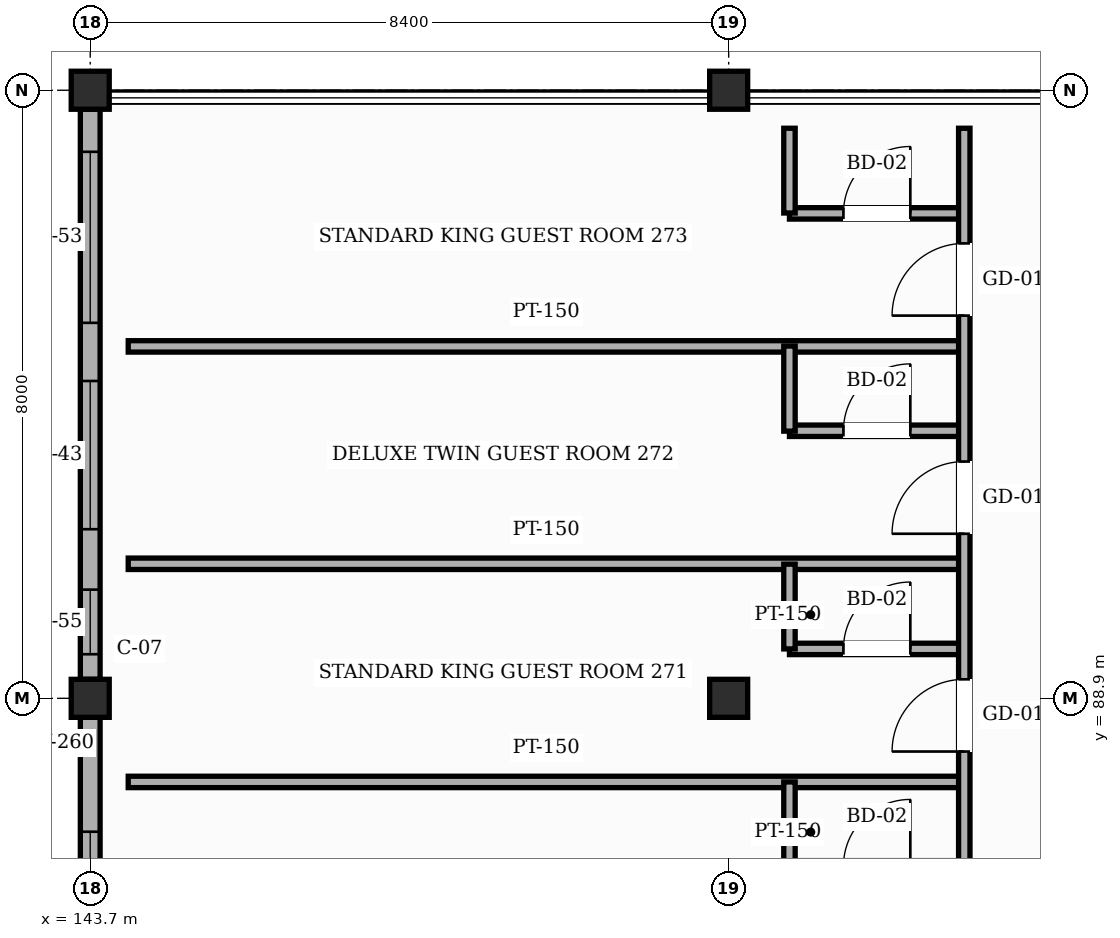
"""IFC4 building model, lengths in metres.
Left out: names, types, materials, properties, quantities, classifications, styles, units other than length and angle.
Written with IfcOpenShell. Run it as: python <this file> out.ifc"""

import sys

from ifc_helpers import new_model, si_unit, direction, frame, frame_2d, origin, origin_2d, place, context, subcontext, project, spatial, rectangle, hollow_rectangle, extrude, element, fill, save


model = new_model("IFC4")
c1 = context("Model", 3, precision=1e-05, world=origin(), true_north=direction((0.0, 1.0)))
c2 = subcontext(c1, "Body", "Model", "MODEL_VIEW")
j1 = project(units=[si_unit("LENGTHUNIT", "METRE"), si_unit("PLANEANGLEUNIT", "RADIAN")], contexts=[c1])
p1 = place(None, origin())
s1 = spatial("IfcSite", under=j1, at=p1, CompositionType="ELEMENT")
p2 = place(p1, origin())
s2 = spatial("IfcBuilding", under=s1, at=p2, CompositionType="ELEMENT")
p3 = place(p2, frame((0.0, 0.0, 39.0)))
s3 = spatial("IfcBuildingStorey", under=s2, at=p3, CompositionType="ELEMENT", Elevation=39.0)
for number, where, z_axis, x_axis in (
    (1, (143.7, 88.9, 0.0), (0.0, 0.0, 1.0), (1.0, 0.0, 0.0)),
    (2, (143.7, 96.9, 0.0), (0.0, 0.0, 1.0), (1.0, 0.0, 0.0)),
    (3, (152.1, 88.9, 0.0), (0.0, 0.0, 1.0), (1.0, 0.0, 0.0)),
    (4, (152.1, 96.9, 0.0), (0.0, 0.0, 1.0), (1.0, 0.0, 0.0)),
):
    element("IfcColumn", number, at=place(p3, frame(where, z_axis=z_axis, x_axis=x_axis)), inside=s3, PredefinedType="COLUMN", context=c2, shape_type="SweptSolid", body=[
        extrude(hollow_rectangle(XDim=0.5, YDim=0.5, WallThickness=0.022, InnerFilletRadius=0.022, OuterFilletRadius=0.044, at=origin_2d()), origin(), (0.0, 0.0, 1.0), 3.38),
    ])
p4 = place(p3, frame((143.7, 81.15, 0.0), z_axis=(0.0, 0.0, 1.0), x_axis=(0.0, 1.0, 0.0)))
e5 = element("IfcWall", 5, at=p4, inside=s3, PredefinedType="SOLIDWALL", context=c2, shape_type="SweptSolid", body=[
    extrude(rectangle(XDim=7.5, YDim=0.26, at=frame_2d((3.75, 0.0))), origin(), (0.0, 0.0, 1.0), 2.805),
])
p5 = place(p4, frame((1.675, 0.0, 0.85)))
e6 = element("IfcOpeningElement", 6, at=p5, cuts=e5, PredefinedType="OPENING", context=c2, shape_type="SweptSolid", body=[
    extrude(rectangle(XDim=1.35, YDim=1.65, at=frame_2d((0.675, 0.825))), frame((0.0, 0.14, 0.0), z_axis=(0.0, -1.0, 0.0), x_axis=(1.0, 0.0, 0.0)), (0.0, 0.0, 1.0), 0.28),
])
p6 = place(p4, frame((4.445, 0.0, 0.85)))
e7 = element("IfcOpeningElement", 7, at=p6, cuts=e5, PredefinedType="OPENING", context=c2, shape_type="SweptSolid", body=[
    extrude(rectangle(XDim=1.55, YDim=1.65, at=frame_2d((0.775, 0.825))), frame((0.0, 0.14, 0.0), z_axis=(0.0, -1.0, 0.0), x_axis=(1.0, 0.0, 0.0)), (0.0, 0.0, 1.0), 0.28),
])
p7 = place(p3, frame((143.7, 89.15, 0.0), z_axis=(0.0, 0.0, 1.0), x_axis=(0.0, 1.0, 0.0)))
e8 = element("IfcWall", 8, at=p7, inside=s3, PredefinedType="SOLIDWALL", context=c2, shape_type="SweptSolid", body=[
    extrude(rectangle(XDim=7.5, YDim=0.26, at=frame_2d((3.75, 0.0))), origin(), (0.0, 0.0, 1.0), 2.805),
])
p8 = place(p7, frame((0.33, 0.0, 0.85)))
e9 = element("IfcOpeningElement", 9, at=p8, cuts=e8, PredefinedType="OPENING", context=c2, shape_type="SweptSolid", body=[
    extrude(rectangle(XDim=0.85, YDim=1.35, at=frame_2d((0.425, 0.675))), frame((0.0, 0.14, 0.0), z_axis=(0.0, -1.0, 0.0), x_axis=(1.0, 0.0, 0.0)), (0.0, 0.0, 1.0), 0.28),
])
p9 = place(p7, frame((1.975, 0.0, 0.85)))
e10 = element("IfcOpeningElement", 10, at=p9, cuts=e8, PredefinedType="OPENING", context=c2, shape_type="SweptSolid", body=[
    extrude(rectangle(XDim=1.95, YDim=1.65, at=frame_2d((0.975, 0.825))), frame((0.0, 0.14, 0.0), z_axis=(0.0, -1.0, 0.0), x_axis=(1.0, 0.0, 0.0)), (0.0, 0.0, 1.0), 0.28),
])
p10 = place(p7, frame((4.69, 0.0, 0.85)))
e11 = element("IfcOpeningElement", 11, at=p10, cuts=e8, PredefinedType="OPENING", context=c2, shape_type="SweptSolid", body=[
    extrude(rectangle(XDim=2.25, YDim=1.65, at=frame_2d((1.125, 0.825))), frame((0.0, 0.14, 0.0), z_axis=(0.0, -1.0, 0.0), x_axis=(1.0, 0.0, 0.0)), (0.0, 0.0, 1.0), 0.28),
])
p11 = place(p3, frame((144.2, 87.8, 0.0), z_axis=(0.0, 0.0, 1.0), x_axis=(1.0, 0.0, 0.0)))
e12 = element("IfcWall", 12, at=p11, inside=s3, PredefinedType="PARTITIONING", context=c2, shape_type="SweptSolid", body=[
    extrude(rectangle(XDim=11.0, YDim=0.15, at=frame_2d((5.5, 0.0))), origin(), (0.0, 0.0, 1.0), 3.365),
])
p12 = place(p3, frame((152.9, 89.55, 0.0), z_axis=(0.0, 0.0, 1.0), x_axis=(1.0, 0.0, 0.0)))
e13 = element("IfcWall", 13, at=p12, inside=s3, PredefinedType="PARTITIONING", context=c2, shape_type="SweptSolid", body=[
    extrude(rectangle(XDim=2.3, YDim=0.15, at=frame_2d((1.15, 0.0))), origin(), (0.0, 0.0, 1.0), 3.365),
])
p13 = place(p12, frame((0.71, 0.0, 0.0)))
e14 = element("IfcOpeningElement", 14, at=p13, cuts=e13, PredefinedType="OPENING", context=c2, shape_type="SweptSolid", body=[
    extrude(rectangle(XDim=0.88, YDim=2.12, at=frame_2d((0.44, 1.06))), frame((0.0, 0.085, 0.0), z_axis=(0.0, -1.0, 0.0), x_axis=(1.0, 0.0, 0.0)), (0.0, 0.0, 1.0), 0.17),
])
p14 = place(p3, frame((144.2, 90.67, 0.0), z_axis=(0.0, 0.0, 1.0), x_axis=(1.0, 0.0, 0.0)))
e15 = element("IfcWall", 15, at=p14, inside=s3, PredefinedType="PARTITIONING", context=c2, shape_type="SweptSolid", body=[
    extrude(rectangle(XDim=11.0, YDim=0.15, at=frame_2d((5.5, 0.0))), origin(), (0.0, 0.0, 1.0), 3.365),
])
p15 = place(p3, frame((152.9, 92.42, 0.0), z_axis=(0.0, 0.0, 1.0), x_axis=(1.0, 0.0, 0.0)))
e16 = element("IfcWall", 16, at=p15, inside=s3, PredefinedType="PARTITIONING", context=c2, shape_type="SweptSolid", body=[
    extrude(rectangle(XDim=2.3, YDim=0.15, at=frame_2d((1.15, 0.0))), origin(), (0.0, 0.0, 1.0), 3.365),
])
p16 = place(p15, frame((0.71, 0.0, 0.0)))
e17 = element("IfcOpeningElement", 17, at=p16, cuts=e16, PredefinedType="OPENING", context=c2, shape_type="SweptSolid", body=[
    extrude(rectangle(XDim=0.88, YDim=2.12, at=frame_2d((0.44, 1.06))), frame((0.0, 0.085, 0.0), z_axis=(0.0, -1.0, 0.0), x_axis=(1.0, 0.0, 0.0)), (0.0, 0.0, 1.0), 0.17),
])
p17 = place(p3, frame((144.2, 93.53, 0.0), z_axis=(0.0, 0.0, 1.0), x_axis=(1.0, 0.0, 0.0)))
e18 = element("IfcWall", 18, at=p17, inside=s3, PredefinedType="PARTITIONING", context=c2, shape_type="SweptSolid", body=[
    extrude(rectangle(XDim=11.0, YDim=0.15, at=frame_2d((5.5, 0.0))), origin(), (0.0, 0.0, 1.0), 3.365),
])
p18 = place(p3, frame((152.9, 95.28, 0.0), z_axis=(0.0, 0.0, 1.0), x_axis=(1.0, 0.0, 0.0)))
e19 = element("IfcWall", 19, at=p18, inside=s3, PredefinedType="PARTITIONING", context=c2, shape_type="SweptSolid", body=[
    extrude(rectangle(XDim=2.3, YDim=0.15, at=frame_2d((1.15, 0.0))), origin(), (0.0, 0.0, 1.0), 3.365),
])
p19 = place(p18, frame((0.71, 0.0, 0.0)))
e20 = element("IfcOpeningElement", 20, at=p19, cuts=e19, PredefinedType="OPENING", context=c2, shape_type="SweptSolid", body=[
    extrude(rectangle(XDim=0.88, YDim=2.12, at=frame_2d((0.44, 1.06))), frame((0.0, 0.085, 0.0), z_axis=(0.0, -1.0, 0.0), x_axis=(1.0, 0.0, 0.0)), (0.0, 0.0, 1.0), 0.17),
])
for number, where, z_axis, x_axis in (
    (21, (152.9, 86.685, 0.0), (0.0, 0.0, 1.0), (0.0, 1.0, 0.0)),
    (22, (152.9, 89.55, 0.0), (0.0, 0.0, 1.0), (0.0, 1.0, 0.0)),
):
    element("IfcWall", number, at=place(p3, frame(where, z_axis=z_axis, x_axis=x_axis)), inside=s3, PredefinedType="PARTITIONING", context=c2, shape_type="SweptSolid", body=[
        extrude(rectangle(XDim=1.115, YDim=0.15, at=frame_2d((0.558, 0.0))), origin(), (0.0, 0.0, 1.0), 3.365),
    ])
p20 = place(p3, frame((152.9, 92.415, 0.0), z_axis=(0.0, 0.0, 1.0), x_axis=(0.0, 1.0, 0.0)))
e23 = element("IfcWall", 23, at=p20, inside=s3, PredefinedType="PARTITIONING", context=c2, shape_type="SweptSolid", body=[
    extrude(rectangle(XDim=1.12, YDim=0.15, at=frame_2d((0.56, 0.0))), origin(), (0.0, 0.0, 1.0), 3.365),
])
p21 = place(p3, frame((152.9, 95.285, 0.0), z_axis=(0.0, 0.0, 1.0), x_axis=(0.0, 1.0, 0.0)))
e24 = element("IfcWall", 24, at=p21, inside=s3, PredefinedType="PARTITIONING", context=c2, shape_type="SweptSolid", body=[
    extrude(rectangle(XDim=1.115, YDim=0.15, at=frame_2d((0.558, 0.0))), origin(), (0.0, 0.0, 1.0), 3.365),
])
p22 = place(p3, frame((155.2, 62.0, 0.0), z_axis=(0.0, 0.0, 1.0), x_axis=(0.0, 1.0, 0.0)))
e25 = element("IfcWall", 25, at=p22, inside=s3, PredefinedType="PARTITIONING", context=c2, shape_type="SweptSolid", body=[
    extrude(rectangle(XDim=34.4, YDim=0.15, at=frame_2d((17.2, 0.0))), origin(), (0.0, 0.0, 1.0), 3.365),
])
p23 = place(p22, frame((0.325, 0.0, 0.0)))
e26 = element("IfcOpeningElement", 26, at=p23, cuts=e25, PredefinedType="OPENING", context=c2, shape_type="SweptSolid", body=[
    extrude(rectangle(XDim=1.1, YDim=2.2, at=frame_2d((0.55, 1.1))), frame((0.0, 0.085, 0.0), z_axis=(0.0, -1.0, 0.0), x_axis=(1.0, 0.0, 0.0)), (0.0, 0.0, 1.0), 0.17),
])
p24 = place(p22, frame((3.265, 0.0, 0.0)))
e27 = element("IfcOpeningElement", 27, at=p24, cuts=e25, PredefinedType="OPENING", context=c2, shape_type="SweptSolid", body=[
    extrude(rectangle(XDim=0.95, YDim=2.15, at=frame_2d((0.475, 1.075))), frame((0.0, 0.085, 0.0), z_axis=(0.0, -1.0, 0.0), x_axis=(1.0, 0.0, 0.0)), (0.0, 0.0, 1.0), 0.17),
])
p25 = place(p22, frame((6.135, 0.0, 0.0)))
e28 = element("IfcOpeningElement", 28, at=p25, cuts=e25, PredefinedType="OPENING", context=c2, shape_type="SweptSolid", body=[
    extrude(rectangle(XDim=0.95, YDim=2.15, at=frame_2d((0.475, 1.075))), frame((0.0, 0.085, 0.0), z_axis=(0.0, -1.0, 0.0), x_axis=(1.0, 0.0, 0.0)), (0.0, 0.0, 1.0), 0.17),
])
p26 = place(p22, frame((9.0, 0.0, 0.0)))
e29 = element("IfcOpeningElement", 29, at=p26, cuts=e25, PredefinedType="OPENING", context=c2, shape_type="SweptSolid", body=[
    extrude(rectangle(XDim=0.95, YDim=2.15, at=frame_2d((0.475, 1.075))), frame((0.0, 0.085, 0.0), z_axis=(0.0, -1.0, 0.0), x_axis=(1.0, 0.0, 0.0)), (0.0, 0.0, 1.0), 0.17),
])
p27 = place(p22, frame((11.865, 0.0, 0.0)))
e30 = element("IfcOpeningElement", 30, at=p27, cuts=e25, PredefinedType="OPENING", context=c2, shape_type="SweptSolid", body=[
    extrude(rectangle(XDim=0.95, YDim=2.15, at=frame_2d((0.475, 1.075))), frame((0.0, 0.085, 0.0), z_axis=(0.0, -1.0, 0.0), x_axis=(1.0, 0.0, 0.0)), (0.0, 0.0, 1.0), 0.17),
])
p28 = place(p22, frame((14.735, 0.0, 0.0)))
e31 = element("IfcOpeningElement", 31, at=p28, cuts=e25, PredefinedType="OPENING", context=c2, shape_type="SweptSolid", body=[
    extrude(rectangle(XDim=0.95, YDim=2.15, at=frame_2d((0.475, 1.075))), frame((0.0, 0.085, 0.0), z_axis=(0.0, -1.0, 0.0), x_axis=(1.0, 0.0, 0.0)), (0.0, 0.0, 1.0), 0.17),
])
p29 = place(p22, frame((17.6, 0.0, 0.0)))
e32 = element("IfcOpeningElement", 32, at=p29, cuts=e25, PredefinedType="OPENING", context=c2, shape_type="SweptSolid", body=[
    extrude(rectangle(XDim=0.95, YDim=2.15, at=frame_2d((0.475, 1.075))), frame((0.0, 0.085, 0.0), z_axis=(0.0, -1.0, 0.0), x_axis=(1.0, 0.0, 0.0)), (0.0, 0.0, 1.0), 0.17),
])
p30 = place(p22, frame((20.465, 0.0, 0.0)))
e33 = element("IfcOpeningElement", 33, at=p30, cuts=e25, PredefinedType="OPENING", context=c2, shape_type="SweptSolid", body=[
    extrude(rectangle(XDim=0.95, YDim=2.15, at=frame_2d((0.475, 1.075))), frame((0.0, 0.085, 0.0), z_axis=(0.0, -1.0, 0.0), x_axis=(1.0, 0.0, 0.0)), (0.0, 0.0, 1.0), 0.17),
])
p31 = place(p22, frame((23.335, 0.0, 0.0)))
e34 = element("IfcOpeningElement", 34, at=p31, cuts=e25, PredefinedType="OPENING", context=c2, shape_type="SweptSolid", body=[
    extrude(rectangle(XDim=0.95, YDim=2.15, at=frame_2d((0.475, 1.075))), frame((0.0, 0.085, 0.0), z_axis=(0.0, -1.0, 0.0), x_axis=(1.0, 0.0, 0.0)), (0.0, 0.0, 1.0), 0.17),
])
p32 = place(p22, frame((26.2, 0.0, 0.0)))
e35 = element("IfcOpeningElement", 35, at=p32, cuts=e25, PredefinedType="OPENING", context=c2, shape_type="SweptSolid", body=[
    extrude(rectangle(XDim=0.95, YDim=2.15, at=frame_2d((0.475, 1.075))), frame((0.0, 0.085, 0.0), z_axis=(0.0, -1.0, 0.0), x_axis=(1.0, 0.0, 0.0)), (0.0, 0.0, 1.0), 0.17),
])
p33 = place(p22, frame((29.065, 0.0, 0.0)))
e36 = element("IfcOpeningElement", 36, at=p33, cuts=e25, PredefinedType="OPENING", context=c2, shape_type="SweptSolid", body=[
    extrude(rectangle(XDim=0.95, YDim=2.15, at=frame_2d((0.475, 1.075))), frame((0.0, 0.085, 0.0), z_axis=(0.0, -1.0, 0.0), x_axis=(1.0, 0.0, 0.0)), (0.0, 0.0, 1.0), 0.17),
])
p34 = place(p22, frame((31.935, 0.0, 0.0)))
e37 = element("IfcOpeningElement", 37, at=p34, cuts=e25, PredefinedType="OPENING", context=c2, shape_type="SweptSolid", body=[
    extrude(rectangle(XDim=0.95, YDim=2.15, at=frame_2d((0.475, 1.075))), frame((0.0, 0.085, 0.0), z_axis=(0.0, -1.0, 0.0), x_axis=(1.0, 0.0, 0.0)), (0.0, 0.0, 1.0), 0.17),
])
p35 = place(p6, origin())
e38 = element("IfcWindow", 38, at=p35, inside=s3, PartitioningType="SINGLE_PANEL", PredefinedType="WINDOW", context=c2, shape_type="SweptSolid", body=[
    extrude(rectangle(XDim=1.55, YDim=1.65, at=frame_2d((0.775, 0.825))), frame((0.0, 0.03, 0.0), z_axis=(0.0, -1.0, 0.0), x_axis=(1.0, 0.0, 0.0)), (0.0, 0.0, 1.0), 0.06),
])
fill(e7, e38)
p36 = place(p8, origin())
e39 = element("IfcWindow", 39, at=p36, inside=s3, PartitioningType="SINGLE_PANEL", PredefinedType="WINDOW", context=c2, shape_type="SweptSolid", body=[
    extrude(rectangle(XDim=0.85, YDim=1.35, at=frame_2d((0.425, 0.675))), frame((0.0, 0.03, 0.0), z_axis=(0.0, -1.0, 0.0), x_axis=(1.0, 0.0, 0.0)), (0.0, 0.0, 1.0), 0.06),
])
fill(e9, e39)
p37 = place(p9, origin())
e40 = element("IfcWindow", 40, at=p37, inside=s3, PartitioningType="SINGLE_PANEL", PredefinedType="WINDOW", context=c2, shape_type="SweptSolid", body=[
    extrude(rectangle(XDim=1.95, YDim=1.65, at=frame_2d((0.975, 0.825))), frame((0.0, 0.03, 0.0), z_axis=(0.0, -1.0, 0.0), x_axis=(1.0, 0.0, 0.0)), (0.0, 0.0, 1.0), 0.06),
])
fill(e10, e40)
p38 = place(p10, origin())
e41 = element("IfcWindow", 41, at=p38, inside=s3, PartitioningType="SINGLE_PANEL", PredefinedType="WINDOW", context=c2, shape_type="SweptSolid", body=[
    extrude(rectangle(XDim=2.25, YDim=1.65, at=frame_2d((1.125, 0.825))), frame((0.0, 0.03, 0.0), z_axis=(0.0, -1.0, 0.0), x_axis=(1.0, 0.0, 0.0)), (0.0, 0.0, 1.0), 0.06),
])
fill(e11, e41)
p39 = place(p32, origin())
e42 = element("IfcDoor", 42, at=p39, inside=s3, OperationType="SINGLE_SWING_LEFT", PredefinedType="DOOR", context=c2, shape_type="SweptSolid", body=[
    extrude(rectangle(XDim=0.95, YDim=2.15, at=frame_2d((0.475, 1.075))), frame((0.0, 0.025, 0.0), z_axis=(0.0, -1.0, 0.0), x_axis=(1.0, 0.0, 0.0)), (0.0, 0.0, 1.0), 0.05),
])
fill(e35, e42)
p40 = place(p13, origin())
e43 = element("IfcDoor", 43, at=p40, inside=s3, OperationType="SINGLE_SWING_RIGHT", PredefinedType="DOOR", context=c2, shape_type="SweptSolid", body=[
    extrude(rectangle(XDim=0.88, YDim=2.12, at=frame_2d((0.44, 1.06))), frame((0.0, 0.025, 0.0), z_axis=(0.0, -1.0, 0.0), x_axis=(1.0, 0.0, 0.0)), (0.0, 0.0, 1.0), 0.05),
])
fill(e14, e43)
p41 = place(p33, origin())
e44 = element("IfcDoor", 44, at=p41, inside=s3, OperationType="SINGLE_SWING_LEFT", PredefinedType="DOOR", context=c2, shape_type="SweptSolid", body=[
    extrude(rectangle(XDim=0.95, YDim=2.15, at=frame_2d((0.475, 1.075))), frame((0.0, 0.025, 0.0), z_axis=(0.0, -1.0, 0.0), x_axis=(1.0, 0.0, 0.0)), (0.0, 0.0, 1.0), 0.05),
])
fill(e36, e44)
p42 = place(p16, origin())
e45 = element("IfcDoor", 45, at=p42, inside=s3, OperationType="SINGLE_SWING_RIGHT", PredefinedType="DOOR", context=c2, shape_type="SweptSolid", body=[
    extrude(rectangle(XDim=0.88, YDim=2.12, at=frame_2d((0.44, 1.06))), frame((0.0, 0.025, 0.0), z_axis=(0.0, -1.0, 0.0), x_axis=(1.0, 0.0, 0.0)), (0.0, 0.0, 1.0), 0.05),
])
fill(e17, e45)
p43 = place(p34, origin())
e46 = element("IfcDoor", 46, at=p43, inside=s3, OperationType="SINGLE_SWING_LEFT", PredefinedType="DOOR", context=c2, shape_type="SweptSolid", body=[
    extrude(rectangle(XDim=0.95, YDim=2.15, at=frame_2d((0.475, 1.075))), frame((0.0, 0.025, 0.0), z_axis=(0.0, -1.0, 0.0), x_axis=(1.0, 0.0, 0.0)), (0.0, 0.0, 1.0), 0.05),
])
fill(e37, e46)
p44 = place(p19, origin())
e47 = element("IfcDoor", 47, at=p44, inside=s3, OperationType="SINGLE_SWING_RIGHT", PredefinedType="DOOR", context=c2, shape_type="SweptSolid", body=[
    extrude(rectangle(XDim=0.88, YDim=2.12, at=frame_2d((0.44, 1.06))), frame((0.0, 0.025, 0.0), z_axis=(0.0, -1.0, 0.0), x_axis=(1.0, 0.0, 0.0)), (0.0, 0.0, 1.0), 0.05),
])
fill(e20, e47)
save(model, sys.argv[1])
